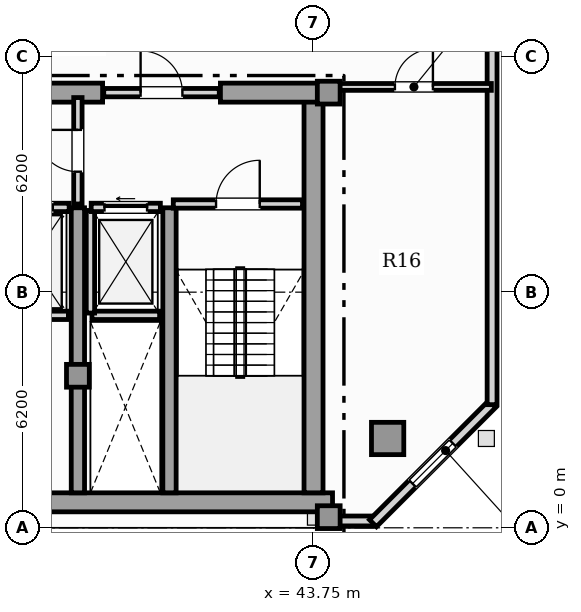
"""IFC4 building model, lengths in metres.
Left out: names, types, materials, properties, quantities, classifications, styles, units other than length and angle.
Written with IfcOpenShell. Run it as: python <this file> out.ifc"""

import sys

from ifc_helpers import new_model, si_unit, direction, frame, frame_2d, origin, origin_2d, place, context, subcontext, project, spatial, rectangle, hollow_rectangle, extrude, element, fill, save


model = new_model("IFC4")
c1 = context("Model", 3, precision=1e-05, world=origin(), true_north=direction((0.0, 1.0)))
c2 = subcontext(c1, "Body", "Model", "MODEL_VIEW")
j1 = project(units=[si_unit("LENGTHUNIT", "METRE"), si_unit("PLANEANGLEUNIT", "RADIAN")], contexts=[c1])
p1 = place(None, origin())
s1 = spatial("IfcSite", under=j1, at=p1, CompositionType="ELEMENT")
p2 = place(p1, origin())
s2 = spatial("IfcBuilding", under=s1, at=p2, CompositionType="ELEMENT")
p3 = place(p2, frame((0.0, 0.0, 313.05)))
s3 = spatial("IfcBuildingStorey", under=s2, at=p3, CompositionType="ELEMENT", Elevation=313.05)
p4 = place(p3, frame((13.25, 0.67, 0.0), z_axis=(0.0, 0.0, 1.0), x_axis=(1.0, 0.0, 0.0)))
e1 = element("IfcWall", 1, at=p4, inside=s3, PredefinedType="SHEAR", context=c2, shape_type="SweptSolid", body=[
    extrude(rectangle(XDim=31.0, YDim=0.5, at=frame_2d((15.5, 0.0))), origin(), (0.0, 0.0, 1.0), 3.65),
])
p5 = place(p3, frame((43.75, 0.92, 0.0), z_axis=(0.0, 0.0, 1.0), x_axis=(0.0, 1.0, 0.0)))
e2 = element("IfcWall", 2, at=p5, inside=s3, PredefinedType="SHEAR", context=c2, shape_type="SweptSolid", body=[
    extrude(rectangle(XDim=10.53, YDim=0.5, at=frame_2d((5.265, 0.0))), origin(), (0.0, 0.0, 1.0), 3.65),
])
p6 = place(p3, frame((30.9, 11.45, 0.0), z_axis=(0.0, 0.0, 1.0), x_axis=(1.0, 0.0, 0.0)))
e3 = element("IfcWall", 3, at=p6, inside=s3, PredefinedType="SHEAR", context=c2, shape_type="SweptSolid", body=[
    extrude(rectangle(XDim=7.3, YDim=0.5, at=frame_2d((3.65, 0.0))), origin(), (0.0, 0.0, 1.0), 3.65),
])
p7 = place(p3, frame((41.3, 11.45, 0.0), z_axis=(0.0, 0.0, 1.0), x_axis=(1.0, 0.0, 0.0)))
e4 = element("IfcWall", 4, at=p7, inside=s3, PredefinedType="SHEAR", context=c2, shape_type="SweptSolid", body=[
    extrude(rectangle(XDim=2.95, YDim=0.5, at=frame_2d((1.475, 0.0))), origin(), (0.0, 0.0, 1.0), 3.65),
])
for number, where, z_axis, x_axis in (
    (5, (37.55, 0.92, 0.0), (0.0, 0.0, 1.0), (0.0, 1.0, 0.0)),
    (6, (39.96, 0.92, 0.0), (0.0, 0.0, 1.0), (0.0, 1.0, 0.0)),
):
    element("IfcWall", number, at=place(p3, frame(where, z_axis=z_axis, x_axis=x_axis)), inside=s3, PredefinedType="SHEAR", context=c2, shape_type="SweptSolid", body=[
        extrude(rectangle(XDim=7.5, YDim=0.35, at=frame_2d((3.75, 0.0))), origin(), (0.0, 0.0, 1.0), 3.65),
    ])
for number, where, z_axis, x_axis in (
    (7, (44.15, 0.28, 0.0), (0.0, 0.0, 1.0), (1.0, 0.0, 0.0)),
    (8, (44.15, 11.45, 0.0), (0.0, 0.0, 1.0), (1.0, 0.0, 0.0)),
    (9, (37.55, 4.0, 0.0), (0.0, 0.0, 1.0), (1.0, 0.0, 0.0)),
):
    element("IfcColumn", number, at=place(p3, frame(where, z_axis=z_axis, x_axis=x_axis)), inside=s3, PredefinedType="COLUMN", context=c2, shape_type="SweptSolid", body=[
        extrude(rectangle(XDim=0.6, YDim=0.6, at=origin_2d()), origin(), (0.0, 0.0, 1.0), 3.85),
    ])
p8 = place(p3, frame((45.7, 2.35, 0.0), z_axis=(0.0, 0.0, 1.0), x_axis=(1.0, 0.0, 0.0)))
e10 = element("IfcColumn", 10, at=p8, inside=s3, PredefinedType="USERDEFINED", context=c2, shape_type="SweptSolid", body=[
    extrude(hollow_rectangle(XDim=0.85, YDim=0.85, WallThickness=0.05, at=origin_2d()), origin(), (0.0, 0.0, 1.0), 3.85),
])
p9 = place(p3, frame((44.25, 0.18, 0.0), z_axis=(0.0, 0.0, 1.0), x_axis=(1.0, 0.0, 0.0)))
e11 = element("IfcWall", 11, at=p9, inside=s3, PredefinedType="SOLIDWALL", context=c2, shape_type="SweptSolid", body=[
    extrude(rectangle(XDim=1.088, YDim=0.26, at=frame_2d((0.544, 0.0))), origin(), (0.0, 0.0, 1.0), 3.65),
])
p10 = place(p3, frame((45.314, 0.12, 0.0), z_axis=(0.0, 0.0, 1.0), x_axis=(0.707106781187, 0.707106781187, 0.0)))
e12 = element("IfcWall", 12, at=p10, inside=s3, PredefinedType="SOLIDWALL", context=c2, shape_type="SweptSolid", body=[
    extrude(rectangle(XDim=4.446, YDim=0.26, at=frame_2d((2.223, 0.0))), origin(), (0.0, 0.0, 1.0), 3.65),
])
p11 = place(p10, frame((1.473, 0.0, 0.9)))
e13 = element("IfcOpeningElement", 13, at=p11, cuts=e12, PredefinedType="OPENING", context=c2, shape_type="SweptSolid", body=[
    extrude(rectangle(XDim=1.5, YDim=1.95, at=frame_2d((0.75, 0.975))), frame((0.0, 0.14, 0.0), z_axis=(0.0, -1.0, 0.0), x_axis=(1.0, 0.0, 0.0)), (0.0, 0.0, 1.0), 0.28),
])
p12 = place(p3, frame((48.448, 3.24, 0.0), z_axis=(0.0, 0.0, 1.0), x_axis=(0.0, 1.0, 0.0)))
e14 = element("IfcWall", 14, at=p12, inside=s3, PredefinedType="SOLIDWALL", context=c2, shape_type="SweptSolid", body=[
    extrude(rectangle(XDim=26.607, YDim=0.26, at=frame_2d((13.304, 0.0))), origin(), (0.0, 0.0, 1.0), 3.65),
])
p13 = place(p12, frame((24.06, 0.0, 0.95)))
e15 = element("IfcOpeningElement", 15, at=p13, cuts=e14, PredefinedType="OPENING", context=c2, shape_type="SweptSolid", body=[
    extrude(rectangle(XDim=0.9, YDim=1.5, at=frame_2d((0.45, 0.75))), frame((0.0, 0.14, 0.0), z_axis=(0.0, -1.0, 0.0), x_axis=(1.0, 0.0, 0.0)), (0.0, 0.0, 1.0), 0.28),
])
p14 = place(p12, frame((11.432, 0.0, 0.9)))
e16 = element("IfcOpeningElement", 16, at=p14, cuts=e14, PredefinedType="OPENING", context=c2, shape_type="SweptSolid", body=[
    extrude(rectangle(XDim=1.5, YDim=1.95, at=frame_2d((0.75, 0.975))), frame((0.0, 0.14, 0.0), z_axis=(0.0, -1.0, 0.0), x_axis=(1.0, 0.0, 0.0)), (0.0, 0.0, 1.0), 0.28),
])
p15 = place(p12, frame((18.017, 0.0, 0.9)))
e17 = element("IfcOpeningElement", 17, at=p15, cuts=e14, PredefinedType="OPENING", context=c2, shape_type="SweptSolid", body=[
    extrude(rectangle(XDim=1.5, YDim=1.95, at=frame_2d((0.75, 0.975))), frame((0.0, 0.14, 0.0), z_axis=(0.0, -1.0, 0.0), x_axis=(1.0, 0.0, 0.0)), (0.0, 0.0, 1.0), 0.28),
])
p16 = place(p3, frame((37.92, 5.59, 0.0), z_axis=(0.0, 0.0, 1.0), x_axis=(1.0, 0.0, 0.0)))
e18 = element("IfcWall", 18, at=p16, inside=s3, PredefinedType="SOLIDWALL", context=c2, shape_type="SweptSolid", body=[
    extrude(rectangle(XDim=1.78, YDim=0.22, at=frame_2d((0.89, 0.0))), origin(), (0.0, 0.0, 1.0), 3.65),
])
p17 = place(p3, frame((37.88, 5.65, 0.0), z_axis=(0.0, 0.0, 1.0), x_axis=(0.0, 1.0, 0.0)))
e19 = element("IfcWall", 19, at=p17, inside=s3, PredefinedType="SOLIDWALL", context=c2, shape_type="SweptSolid", body=[
    extrude(rectangle(XDim=2.7, YDim=0.22, at=frame_2d((1.35, 0.0))), origin(), (0.0, 0.0, 1.0), 3.65),
])
p18 = place(p3, frame((37.9, 8.43, 0.0), z_axis=(0.0, 0.0, 1.0), x_axis=(1.0, 0.0, 0.0)))
e20 = element("IfcWall", 20, at=p18, inside=s3, PredefinedType="SOLIDWALL", context=c2, shape_type="SweptSolid", body=[
    extrude(rectangle(XDim=1.82, YDim=0.22, at=frame_2d((0.91, 0.0))), origin(), (0.0, 0.0, 1.0), 3.65),
])
p19 = place(p18, frame((0.35, 0.0, 0.0)))
e21 = element("IfcOpeningElement", 21, at=p19, cuts=e20, PredefinedType="OPENING", context=c2, shape_type="SweptSolid", body=[
    extrude(rectangle(XDim=1.12, YDim=2.25, at=frame_2d((0.56, 1.125))), frame((0.0, 0.12, 0.0), z_axis=(0.0, -1.0, 0.0), x_axis=(1.0, 0.0, 0.0)), (0.0, 0.0, 1.0), 0.24),
])
p20 = place(p3, frame((35.3, 5.59, 0.0), z_axis=(0.0, 0.0, 1.0), x_axis=(1.0, 0.0, 0.0)))
e22 = element("IfcWall", 22, at=p20, inside=s3, PredefinedType="SOLIDWALL", context=c2, shape_type="SweptSolid", body=[
    extrude(rectangle(XDim=2.0, YDim=0.22, at=frame_2d((1.0, 0.0))), origin(), (0.0, 0.0, 1.0), 3.65),
])
p21 = place(p3, frame((35.28, 8.43, 0.0), z_axis=(0.0, 0.0, 1.0), x_axis=(1.0, 0.0, 0.0)))
e23 = element("IfcWall", 23, at=p21, inside=s3, PredefinedType="SOLIDWALL", context=c2, shape_type="SweptSolid", body=[
    extrude(rectangle(XDim=2.04, YDim=0.22, at=frame_2d((1.02, 0.0))), origin(), (0.0, 0.0, 1.0), 3.65),
])
p22 = place(p21, frame((0.43, 0.0, 0.0)))
e24 = element("IfcOpeningElement", 24, at=p22, cuts=e23, PredefinedType="OPENING", context=c2, shape_type="SweptSolid", body=[
    extrude(rectangle(XDim=1.18, YDim=2.2, at=frame_2d((0.59, 1.1))), frame((0.0, 0.12, 0.0), z_axis=(0.0, -1.0, 0.0), x_axis=(1.0, 0.0, 0.0)), (0.0, 0.0, 1.0), 0.24),
])
p23 = place(p3, frame((40.06, 8.52, 0.0), z_axis=(0.0, 0.0, 1.0), x_axis=(1.0, 0.0, 0.0)))
e25 = element("IfcWall", 25, at=p23, inside=s3, PredefinedType="SOLIDWALL", context=c2, shape_type="SweptSolid", body=[
    extrude(rectangle(XDim=3.4, YDim=0.22, at=frame_2d((1.7, 0.0))), origin(), (0.0, 0.0, 1.0), 3.65),
])
p24 = place(p23, frame((1.125, 0.0, 0.0)))
e26 = element("IfcOpeningElement", 26, at=p24, cuts=e25, PredefinedType="OPENING", context=c2, shape_type="SweptSolid", body=[
    extrude(rectangle(XDim=1.15, YDim=2.2, at=frame_2d((0.575, 1.1))), frame((0.0, 0.12, 0.0), z_axis=(0.0, -1.0, 0.0), x_axis=(1.0, 0.0, 0.0)), (0.0, 0.0, 1.0), 0.24),
])
p25 = place(p3, frame((37.55, 8.52, 0.0), z_axis=(0.0, 0.0, 1.0), x_axis=(0.0, 1.0, 0.0)))
e27 = element("IfcWall", 27, at=p25, inside=s3, PredefinedType="SOLIDWALL", context=c2, shape_type="SweptSolid", body=[
    extrude(rectangle(XDim=2.8, YDim=0.22, at=frame_2d((1.4, 0.0))), origin(), (0.0, 0.0, 1.0), 3.105),
])
p26 = place(p25, frame((0.85, 0.0, 0.0)))
e28 = element("IfcOpeningElement", 28, at=p26, cuts=e27, PredefinedType="OPENING", context=c2, shape_type="SweptSolid", body=[
    extrude(rectangle(XDim=1.1, YDim=2.2, at=frame_2d((0.55, 1.1))), frame((0.0, 0.12, 0.0), z_axis=(0.0, -1.0, 0.0), x_axis=(1.0, 0.0, 0.0)), (0.0, 0.0, 1.0), 0.24),
])
p27 = place(p3, frame((38.23, 11.45, 0.0), z_axis=(0.0, 0.0, 1.0), x_axis=(1.0, 0.0, 0.0)))
e29 = element("IfcWall", 29, at=p27, inside=s3, PredefinedType="SOLIDWALL", context=c2, shape_type="SweptSolid", body=[
    extrude(rectangle(XDim=3.04, YDim=0.22, at=frame_2d((1.52, 0.0))), origin(), (0.0, 0.0, 1.0), 3.65),
])
p28 = place(p27, frame((0.97, 0.0, 0.0)))
e30 = element("IfcOpeningElement", 30, at=p28, cuts=e29, PredefinedType="OPENING", context=c2, shape_type="SweptSolid", body=[
    extrude(rectangle(XDim=1.1, YDim=2.2, at=frame_2d((0.55, 1.1))), frame((0.0, 0.12, 0.0), z_axis=(0.0, -1.0, 0.0), x_axis=(1.0, 0.0, 0.0)), (0.0, 0.0, 1.0), 0.24),
])
p29 = place(p3, frame((44.355, 11.6, 0.0), z_axis=(0.0, 0.0, 1.0), x_axis=(1.0, 0.0, 0.0)))
e31 = element("IfcWall", 31, at=p29, inside=s3, PredefinedType="PARTITIONING", context=c2, shape_type="SweptSolid", body=[
    extrude(rectangle(XDim=4.074, YDim=0.18, at=frame_2d((2.037, 0.0))), origin(), (0.0, 0.0, 1.0), 3.65),
])
p30 = place(p29, frame((1.537, 0.0, 0.0)))
e32 = element("IfcOpeningElement", 32, at=p30, cuts=e31, PredefinedType="OPENING", context=c2, shape_type="SweptSolid", body=[
    extrude(rectangle(XDim=1.0, YDim=2.15, at=frame_2d((0.5, 1.075))), frame((0.0, 0.1, 0.0), z_axis=(0.0, -1.0, 0.0), x_axis=(1.0, 0.0, 0.0)), (0.0, 0.0, 1.0), 0.2),
])
p31 = place(p11, origin())
e33 = element("IfcWindow", 33, at=p31, inside=s3, PartitioningType="SINGLE_PANEL", PredefinedType="WINDOW", context=c2, shape_type="SweptSolid", body=[
    extrude(rectangle(XDim=1.5, YDim=1.95, at=frame_2d((0.75, 0.975))), frame((0.0, 0.03, 0.0), z_axis=(0.0, -1.0, 0.0), x_axis=(1.0, 0.0, 0.0)), (0.0, 0.0, 1.0), 0.06),
])
fill(e13, e33)
p32 = place(p19, origin())
e34 = element("IfcDoor", 34, at=p32, inside=s3, OperationType="SLIDING_TO_LEFT", PredefinedType="DOOR", context=c2, shape_type="SweptSolid", body=[
    extrude(rectangle(XDim=1.12, YDim=2.25, at=frame_2d((0.56, 1.125))), frame((0.0, 0.025, 0.0), z_axis=(0.0, -1.0, 0.0), x_axis=(1.0, 0.0, 0.0)), (0.0, 0.0, 1.0), 0.05),
])
fill(e21, e34)
p33 = place(p22, origin())
e35 = element("IfcDoor", 35, at=p33, inside=s3, OperationType="SLIDING_TO_RIGHT", PredefinedType="DOOR", context=c2, shape_type="SweptSolid", body=[
    extrude(rectangle(XDim=1.18, YDim=2.2, at=frame_2d((0.59, 1.1))), frame((0.0, 0.025, 0.0), z_axis=(0.0, -1.0, 0.0), x_axis=(1.0, 0.0, 0.0)), (0.0, 0.0, 1.0), 0.05),
])
fill(e24, e35)
p34 = place(p24, origin())
e36 = element("IfcDoor", 36, at=p34, inside=s3, OperationType="SINGLE_SWING_RIGHT", PredefinedType="DOOR", context=c2, shape_type="SweptSolid", body=[
    extrude(rectangle(XDim=1.15, YDim=2.2, at=frame_2d((0.575, 1.1))), frame((0.0, 0.025, 0.0), z_axis=(0.0, -1.0, 0.0), x_axis=(1.0, 0.0, 0.0)), (0.0, 0.0, 1.0), 0.05),
])
fill(e26, e36)
p35 = place(p26, origin())
e37 = element("IfcDoor", 37, at=p35, inside=s3, OperationType="SINGLE_SWING_RIGHT", PredefinedType="DOOR", context=c2, shape_type="SweptSolid", body=[
    extrude(rectangle(XDim=1.1, YDim=2.2, at=frame_2d((0.55, 1.1))), frame((0.0, 0.025, 0.0), z_axis=(0.0, -1.0, 0.0), x_axis=(1.0, 0.0, 0.0)), (0.0, 0.0, 1.0), 0.05),
])
fill(e28, e37)
p36 = place(p28, origin())
e38 = element("IfcDoor", 38, at=p36, inside=s3, OperationType="SINGLE_SWING_LEFT", PredefinedType="DOOR", context=c2, shape_type="SweptSolid", body=[
    extrude(rectangle(XDim=1.1, YDim=2.2, at=frame_2d((0.55, 1.1))), frame((0.0, 0.025, 0.0), z_axis=(0.0, -1.0, 0.0), x_axis=(1.0, 0.0, 0.0)), (0.0, 0.0, 1.0), 0.05),
])
fill(e30, e38)
p37 = place(p30, origin())
e39 = element("IfcDoor", 39, at=p37, inside=s3, OperationType="SINGLE_SWING_RIGHT", PredefinedType="DOOR", context=c2, shape_type="SweptSolid", body=[
    extrude(rectangle(XDim=1.0, YDim=2.15, at=frame_2d((0.5, 1.075))), frame((0.0, 0.025, 0.0), z_axis=(0.0, -1.0, 0.0), x_axis=(1.0, 0.0, 0.0)), (0.0, 0.0, 1.0), 0.05),
])
fill(e32, e39)
save(model, sys.argv[1])
